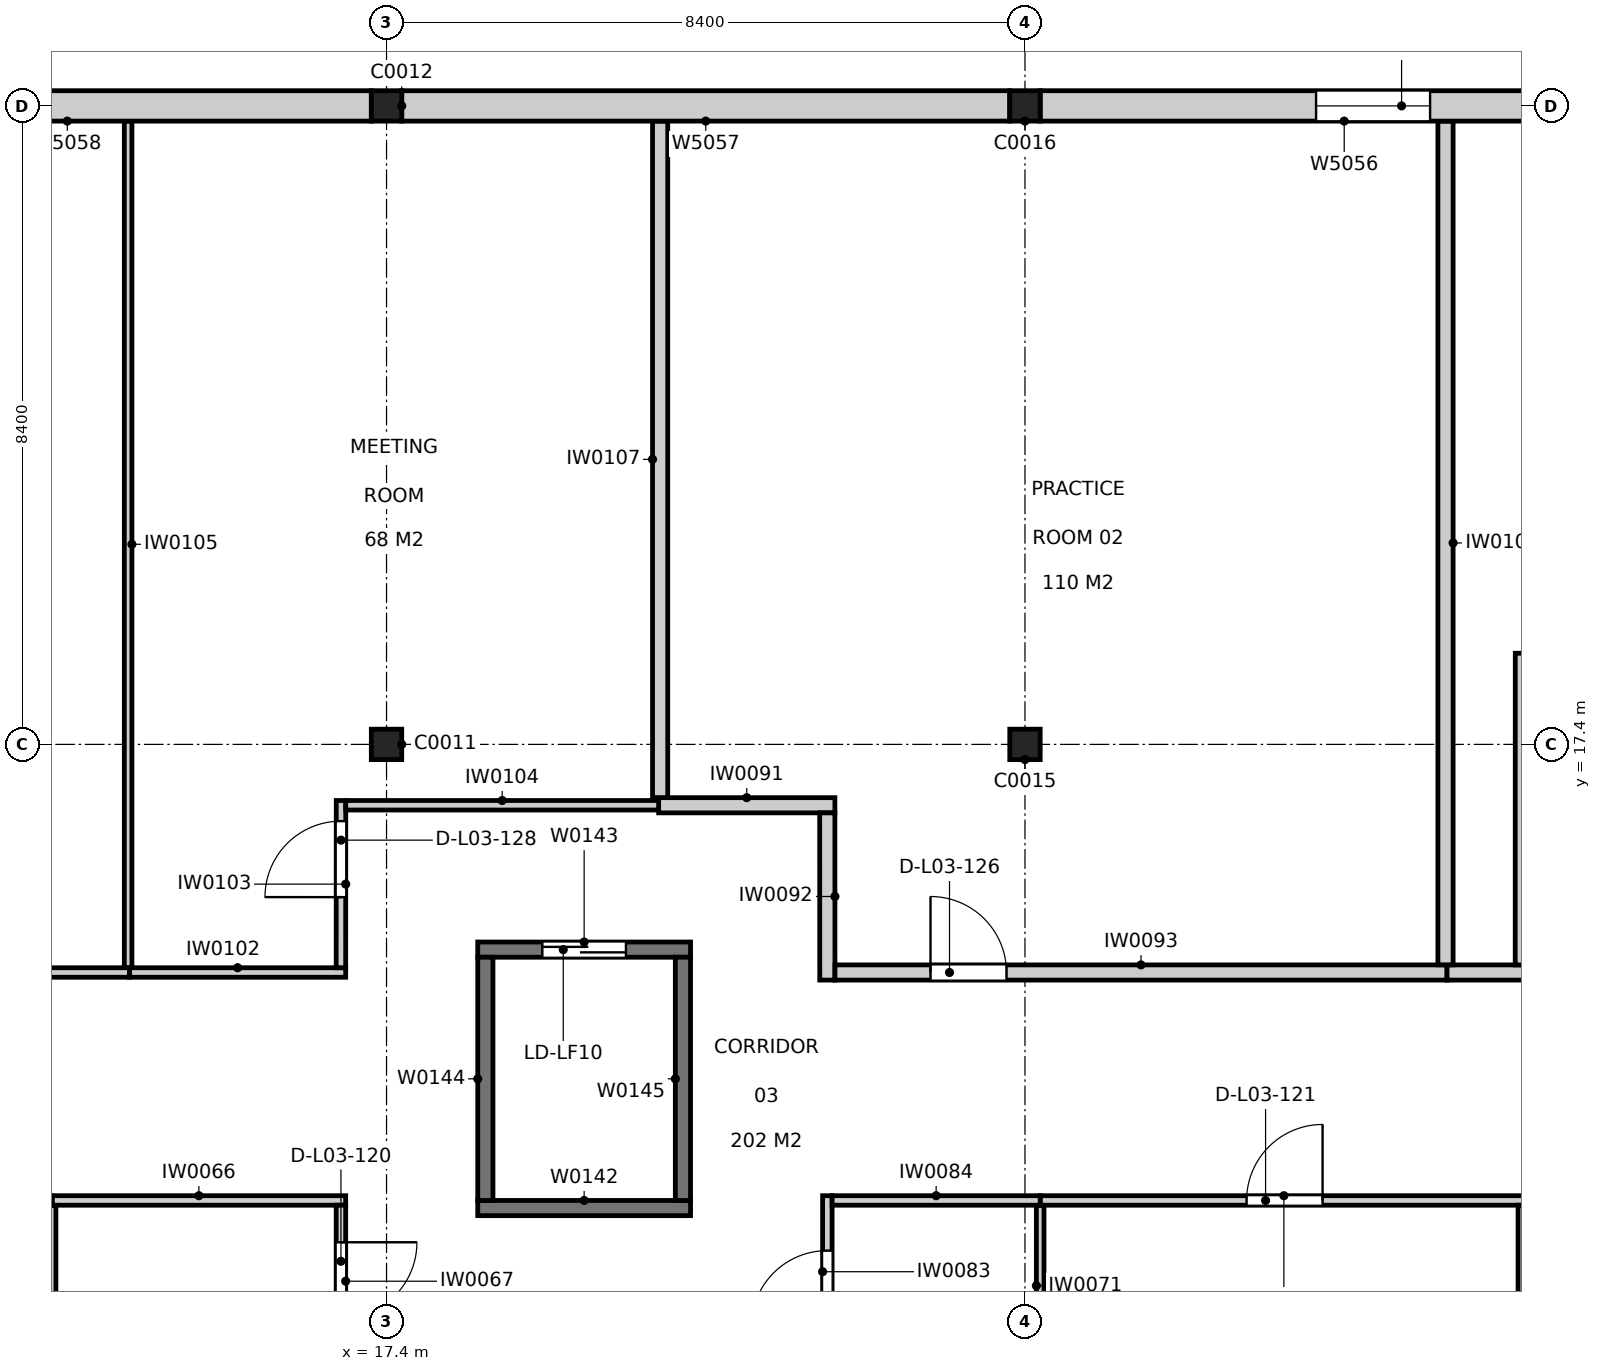
"""IFC4 building model, lengths in metres.
Left out: names, types, materials, properties, quantities, classifications, styles, units other than length and angle.
Written with IfcOpenShell. Run it as: python <this file> out.ifc"""

import sys

from ifc_helpers import new_model, si_unit, direction, frame, frame_2d, origin, origin_2d, place, context, subcontext, project, spatial, rectangle, extrude, element, fill, save


model = new_model("IFC4")
c1 = context("Model", 3, precision=1e-05, world=origin(), true_north=direction((0.0, 1.0)))
c2 = subcontext(c1, "Body", "Model", "MODEL_VIEW")
j1 = project(units=[si_unit("LENGTHUNIT", "METRE"), si_unit("PLANEANGLEUNIT", "RADIAN")], contexts=[c1])
p1 = place(None, origin())
s1 = spatial("IfcSite", under=j1, at=p1, CompositionType="ELEMENT")
p2 = place(p1, origin())
s2 = spatial("IfcBuilding", under=s1, at=p2, CompositionType="ELEMENT")
p3 = place(p2, frame((0.0, 0.0, 14.4)))
s3 = spatial("IfcBuildingStorey", under=s2, at=p3, CompositionType="ELEMENT", Elevation=14.4)
for number, where, z_axis, x_axis in (
    (1, (17.4, 17.4, 0.0), (0.0, 0.0, 1.0), (1.0, 0.0, 0.0)),
    (2, (17.4, 25.8, 0.0), (0.0, 0.0, 1.0), (1.0, 0.0, 0.0)),
    (3, (25.8, 17.4, 0.0), (0.0, 0.0, 1.0), (1.0, 0.0, 0.0)),
    (4, (25.8, 25.8, 0.0), (0.0, 0.0, 1.0), (1.0, 0.0, 0.0)),
):
    element("IfcColumn", number, at=place(p3, frame(where, z_axis=z_axis, x_axis=x_axis)), inside=s3, PredefinedType="COLUMN", context=c2, shape_type="SweptSolid", body=[
        extrude(rectangle(XDim=0.4, YDim=0.4, at=origin_2d()), origin(), (0.0, 0.0, 1.0), 4.8),
    ])
p4 = place(p3, frame((18.6, 11.3, 0.0), z_axis=(0.0, 0.0, 1.0), x_axis=(1.0, 0.0, 0.0)))
e5 = element("IfcWall", 5, at=p4, inside=s3, PredefinedType="SOLIDWALL", context=c2, shape_type="SweptSolid", body=[
    extrude(rectangle(XDim=2.8, YDim=0.2, at=frame_2d((1.4, 0.0))), origin(), (0.0, 0.0, 1.0), 4.8),
])
p5 = place(p3, frame((18.6, 14.7, 0.0), z_axis=(0.0, 0.0, 1.0), x_axis=(1.0, 0.0, 0.0)))
e6 = element("IfcWall", 6, at=p5, inside=s3, PredefinedType="SOLIDWALL", context=c2, shape_type="SweptSolid", body=[
    extrude(rectangle(XDim=2.8, YDim=0.2, at=frame_2d((1.4, 0.0))), origin(), (0.0, 0.0, 1.0), 4.8),
])
p6 = place(p5, frame((0.85, 0.0, 0.0)))
e7 = element("IfcOpeningElement", 7, at=p6, cuts=e6, PredefinedType="OPENING", context=c2, shape_type="SweptSolid", body=[
    extrude(rectangle(XDim=1.1, YDim=2.1, at=frame_2d((0.55, 1.05))), frame((0.0, 0.11, 0.0), z_axis=(0.0, -1.0, 0.0), x_axis=(1.0, 0.0, 0.0)), (0.0, 0.0, 1.0), 0.22),
])
for number, where, z_axis, x_axis in (
    (8, (18.7, 11.4, 0.0), (0.0, 0.0, 1.0), (0.0, 1.0, 0.0)),
    (9, (21.3, 11.4, 0.0), (0.0, 0.0, 1.0), (0.0, 1.0, 0.0)),
):
    element("IfcWall", number, at=place(p3, frame(where, z_axis=z_axis, x_axis=x_axis)), inside=s3, PredefinedType="SOLIDWALL", context=c2, shape_type="SweptSolid", body=[
        extrude(rectangle(XDim=3.2, YDim=0.2, at=frame_2d((1.6, 0.0))), origin(), (0.0, 0.0, 1.0), 4.8),
    ])
p7 = place(p3, frame((13.0, 0.8, 0.0), z_axis=(0.0, 0.0, 1.0), x_axis=(0.0, 1.0, 0.0)))
e10 = element("IfcWall", 10, at=p7, inside=s3, PredefinedType="PARTITIONING", context=c2, shape_type="SweptSolid", body=[
    extrude(rectangle(XDim=10.537, YDim=0.1, at=frame_2d((5.269, 0.0))), origin(), (0.0, 0.0, 1.0), 3.86),
])
p8 = place(p3, frame((13.0, 11.4, 0.0), z_axis=(0.0, 0.0, 1.0), x_axis=(1.0, 0.0, 0.0)))
e11 = element("IfcWall", 11, at=p8, inside=s3, PredefinedType="PARTITIONING", context=c2, shape_type="SweptSolid", body=[
    extrude(rectangle(XDim=3.863, YDim=0.125, at=frame_2d((1.931, 0.0))), origin(), (0.0, 0.0, 1.0), 4.64),
])
p9 = place(p3, frame((16.8, 11.337, 0.0), z_axis=(0.0, 0.0, 1.0), x_axis=(0.0, -1.0, 0.0)))
e12 = element("IfcWall", 12, at=p9, inside=s3, PredefinedType="PARTITIONING", context=c2, shape_type="SweptSolid", body=[
    extrude(rectangle(XDim=2.0, YDim=0.125, at=frame_2d((1.0, 0.0))), origin(), (0.0, 0.0, 1.0), 4.64),
])
p10 = place(p9, frame((0.488, 0.0, 0.0)))
e13 = element("IfcOpeningElement", 13, at=p10, cuts=e12, PredefinedType="OPENING", context=c2, shape_type="SweptSolid", body=[
    extrude(rectangle(XDim=1.0, YDim=2.1, at=frame_2d((0.5, 1.05))), frame((0.0, 0.073, 0.0), z_axis=(0.0, -1.0, 0.0), x_axis=(1.0, 0.0, 0.0)), (0.0, 0.0, 1.0), 0.145),
])
p11 = place(p3, frame((26.0, 9.22, 0.0), z_axis=(0.0, 0.0, 1.0), x_axis=(0.0, 1.0, 0.0)))
e14 = element("IfcWall", 14, at=p11, inside=s3, PredefinedType="PARTITIONING", context=c2, shape_type="SweptSolid", body=[
    extrude(rectangle(XDim=2.117, YDim=0.1, at=frame_2d((1.059, 0.0))), origin(), (0.0, 0.0, 1.0), 3.86),
])
p12 = place(p3, frame((26.0, 11.4, 0.0), z_axis=(0.0, 0.0, 1.0), x_axis=(1.0, 0.0, 0.0)))
e15 = element("IfcWall", 15, at=p12, inside=s3, PredefinedType="PARTITIONING", context=c2, shape_type="SweptSolid", body=[
    extrude(rectangle(XDim=6.413, YDim=0.125, at=frame_2d((3.206, 0.0))), origin(), (0.0, 0.0, 1.0), 4.64),
])
p13 = place(p12, frame((2.716, 0.0, 0.0)))
e16 = element("IfcOpeningElement", 16, at=p13, cuts=e15, PredefinedType="OPENING", context=c2, shape_type="SweptSolid", body=[
    extrude(rectangle(XDim=1.0, YDim=2.1, at=frame_2d((0.5, 1.05))), frame((0.0, 0.073, 0.0), z_axis=(0.0, -1.0, 0.0), x_axis=(1.0, 0.0, 0.0)), (0.0, 0.0, 1.0), 0.145),
])
p14 = place(p3, frame((32.35, 11.337, 0.0), z_axis=(0.0, 0.0, 1.0), x_axis=(0.0, -1.0, 0.0)))
e17 = element("IfcWall", 17, at=p14, inside=s3, PredefinedType="PARTITIONING", context=c2, shape_type="SweptSolid", body=[
    extrude(rectangle(XDim=3.9, YDim=0.125, at=frame_2d((1.95, 0.0))), origin(), (0.0, 0.0, 1.0), 3.86),
])
p15 = place(p3, frame((23.2, 9.462, 0.0), z_axis=(0.0, 0.0, 1.0), x_axis=(0.0, 1.0, 0.0)))
e18 = element("IfcWall", 18, at=p15, inside=s3, PredefinedType="PARTITIONING", context=c2, shape_type="SweptSolid", body=[
    extrude(rectangle(XDim=2.0, YDim=0.125, at=frame_2d((1.0, 0.0))), origin(), (0.0, 0.0, 1.0), 4.64),
])
p16 = place(p15, frame((0.278, 0.0, 0.0)))
e19 = element("IfcOpeningElement", 19, at=p16, cuts=e18, PredefinedType="OPENING", context=c2, shape_type="SweptSolid", body=[
    extrude(rectangle(XDim=1.0, YDim=2.1, at=frame_2d((0.5, 1.05))), frame((0.0, 0.073, 0.0), z_axis=(0.0, -1.0, 0.0), x_axis=(1.0, 0.0, 0.0)), (0.0, 0.0, 1.0), 0.145),
])
p17 = place(p3, frame((23.262, 11.4, 0.0), z_axis=(0.0, 0.0, 1.0), x_axis=(1.0, 0.0, 0.0)))
e20 = element("IfcWall", 20, at=p17, inside=s3, PredefinedType="PARTITIONING", context=c2, shape_type="SweptSolid", body=[
    extrude(rectangle(XDim=2.738, YDim=0.125, at=frame_2d((1.369, 0.0))), origin(), (0.0, 0.0, 1.0), 3.86),
])
p18 = place(p3, frame((9.712, 14.399, 0.0), z_axis=(0.0, 0.0, 1.0), x_axis=(1.0, 0.0, 0.0)))
e21 = element("IfcWall", 21, at=p18, inside=s3, PredefinedType="PARTITIONING", context=c2, shape_type="SweptSolid", body=[
    extrude(rectangle(XDim=4.308, YDim=0.125, at=frame_2d((2.154, 0.0))), origin(), (0.0, 0.0, 1.0), 4.06),
])
p19 = place(p3, frame((20.98, 16.599, 0.0), z_axis=(0.0, 0.0, 1.0), x_axis=(1.0, 0.0, 0.0)))
e22 = element("IfcWall", 22, at=p19, inside=s3, PredefinedType="PARTITIONING", context=c2, shape_type="SweptSolid", body=[
    extrude(rectangle(XDim=2.319, YDim=0.2, at=frame_2d((1.16, 0.0))), origin(), (0.0, 0.0, 1.0), 4.64),
])
p20 = place(p3, frame((23.199, 16.499, 0.0), z_axis=(0.0, 0.0, 1.0), x_axis=(0.000443901854, -0.999999901476, 0.0)))
e23 = element("IfcWall", 23, at=p20, inside=s3, PredefinedType="PARTITIONING", context=c2, shape_type="SweptSolid", body=[
    extrude(rectangle(XDim=2.2, YDim=0.2, at=frame_2d((1.1, 0.0))), origin(), (0.0, 0.0, 1.0), 4.06),
])
p21 = place(p3, frame((23.3, 14.399, 0.0), z_axis=(0.0, 0.0, 1.0), x_axis=(1.0, 0.0, 0.0)))
e24 = element("IfcWall", 24, at=p21, inside=s3, PredefinedType="PARTITIONING", context=c2, shape_type="SweptSolid", body=[
    extrude(rectangle(XDim=8.053, YDim=0.2, at=frame_2d((4.026, 0.0))), origin(), (0.0, 0.0, 1.0), 3.86),
])
p22 = place(p21, frame((1.257, 0.0, 0.0)))
e25 = element("IfcOpeningElement", 25, at=p22, cuts=e24, PredefinedType="OPENING", context=c2, shape_type="SweptSolid", body=[
    extrude(rectangle(XDim=1.0, YDim=2.1, at=frame_2d((0.5, 1.05))), frame((0.0, 0.11, 0.0), z_axis=(0.0, -1.0, 0.0), x_axis=(1.0, 0.0, 0.0)), (0.0, 0.0, 1.0), 0.22),
])
p23 = place(p3, frame((31.353, 14.399, 0.0), z_axis=(0.0, 0.0, 1.0), x_axis=(1.0, 0.0, 0.0)))
e26 = element("IfcWall", 26, at=p23, inside=s3, PredefinedType="PARTITIONING", context=c2, shape_type="SweptSolid", body=[
    extrude(rectangle(XDim=1.097, YDim=0.2, at=frame_2d((0.548, 0.0))), origin(), (0.0, 0.0, 1.0), 4.06),
])
p24 = place(p3, frame((32.35, 14.499, 0.0), z_axis=(0.0, 0.0, 1.0), x_axis=(0.000238180296, 0.999999971635, 0.0)))
e27 = element("IfcWall", 27, at=p24, inside=s3, PredefinedType="PARTITIONING", context=c2, shape_type="SweptSolid", body=[
    extrude(rectangle(XDim=4.1, YDim=0.2, at=frame_2d((2.05, 0.0))), origin(), (0.0, 0.0, 1.0), 3.86),
])
p25 = place(p3, frame((14.02, 14.399, 0.0), z_axis=(0.0, 0.0, 1.0), x_axis=(1.0, 0.0, 0.0)))
e28 = element("IfcWall", 28, at=p25, inside=s3, PredefinedType="PARTITIONING", context=c2, shape_type="SweptSolid", body=[
    extrude(rectangle(XDim=2.843, YDim=0.125, at=frame_2d((1.421, 0.0))), origin(), (0.0, 0.0, 1.0), 4.06),
])
p26 = place(p3, frame((16.8, 14.461, 0.0), z_axis=(0.0, 0.0, 1.0), x_axis=(0.000443852597, 0.999999901497, 0.0)))
e29 = element("IfcWall", 29, at=p26, inside=s3, PredefinedType="PARTITIONING", context=c2, shape_type="SweptSolid", body=[
    extrude(rectangle(XDim=2.2, YDim=0.125, at=frame_2d((1.1, 0.0))), origin(), (0.0, 0.0, 1.0), 4.06),
])
p27 = place(p26, frame((0.929, 0.0, 0.0)))
e30 = element("IfcOpeningElement", 30, at=p27, cuts=e29, PredefinedType="OPENING", context=c2, shape_type="SweptSolid", body=[
    extrude(rectangle(XDim=1.0, YDim=2.1, at=frame_2d((0.5, 1.05))), frame((0.0, 0.073, 0.0), z_axis=(0.0, -1.0, 0.0), x_axis=(1.0, 0.0, 0.0)), (0.0, 0.0, 1.0), 0.145),
])
p28 = place(p3, frame((16.864, 16.599, 0.0), z_axis=(0.0, 0.0, 1.0), x_axis=(1.0, 0.0, 0.0)))
e31 = element("IfcWall", 31, at=p28, inside=s3, PredefinedType="PARTITIONING", context=c2, shape_type="SweptSolid", body=[
    extrude(rectangle(XDim=4.116, YDim=0.125, at=frame_2d((2.058, 0.0))), origin(), (0.0, 0.0, 1.0), 3.86),
])
p29 = place(p3, frame((14.0, 25.6, 0.0), z_axis=(0.0, 0.0, 1.0), x_axis=(0.0, -1.0, 0.0)))
e32 = element("IfcWall", 32, at=p29, inside=s3, PredefinedType="PARTITIONING", context=c2, shape_type="SweptSolid", body=[
    extrude(rectangle(XDim=11.135, YDim=0.1, at=frame_2d((5.567, 0.0))), origin(), (0.0, 0.0, 1.0), 3.86),
])
p30 = place(p3, frame((31.333, 25.6, 0.0), z_axis=(0.0, 0.0, 1.0), x_axis=(0.0, -1.0, 0.0)))
e33 = element("IfcWall", 33, at=p30, inside=s3, PredefinedType="PARTITIONING", context=c2, shape_type="SweptSolid", body=[
    extrude(rectangle(XDim=11.1, YDim=0.2, at=frame_2d((5.55, 0.0))), origin(), (0.0, 0.0, 1.0), 3.86),
])
p31 = place(p3, frame((21.0, 16.7, 0.0), z_axis=(0.0, 0.0, 1.0), x_axis=(0.0, 1.0, 0.0)))
e34 = element("IfcWall", 34, at=p31, inside=s3, PredefinedType="PARTITIONING", context=c2, shape_type="SweptSolid", body=[
    extrude(rectangle(XDim=8.9, YDim=0.2, at=frame_2d((4.45, 0.0))), origin(), (0.0, 0.0, 1.0), 3.86),
])
p32 = place(p3, frame((34.0, 25.8, 0.0), z_axis=(0.0, 0.0, 1.0), x_axis=(-1.0, 0.0, 0.0)))
e35 = element("IfcWall", 35, at=p32, inside=s3, PredefinedType="SOLIDWALL", context=c2, shape_type="SweptSolid", body=[
    extrude(rectangle(XDim=8.0, YDim=0.4, at=frame_2d((4.0, 0.0))), origin(), (0.0, 0.0, 1.0), 3.86),
])
p33 = place(p32, frame((2.87, 0.0, 0.9)))
e36 = element("IfcOpeningElement", 36, at=p33, cuts=e35, PredefinedType="OPENING", context=c2, shape_type="SweptSolid", body=[
    extrude(rectangle(XDim=1.5, YDim=1.5, at=frame_2d((0.75, 0.75))), frame((0.0, 0.21, 0.0), z_axis=(0.0, -1.0, 0.0), x_axis=(1.0, 0.0, 0.0)), (0.0, 0.0, 1.0), 0.42),
])
p34 = place(p3, frame((25.6, 25.8, 0.0), z_axis=(0.0, 0.0, 1.0), x_axis=(-1.0, 0.0, 0.0)))
e37 = element("IfcWall", 37, at=p34, inside=s3, PredefinedType="SOLIDWALL", context=c2, shape_type="SweptSolid", body=[
    extrude(rectangle(XDim=8.0, YDim=0.4, at=frame_2d((4.0, 0.0))), origin(), (0.0, 0.0, 1.0), 3.86),
])
p35 = place(p3, frame((17.2, 25.8, 0.0), z_axis=(0.0, 0.0, 1.0), x_axis=(-1.0, 0.0, 0.0)))
e38 = element("IfcWall", 38, at=p35, inside=s3, PredefinedType="SOLIDWALL", context=c2, shape_type="SweptSolid", body=[
    extrude(rectangle(XDim=8.0, YDim=0.4, at=frame_2d((4.0, 0.0))), origin(), (0.0, 0.0, 1.0), 3.86),
])
p36 = place(p10, origin())
e39 = element("IfcDoor", 39, at=p36, inside=s3, OperationType="SINGLE_SWING_LEFT", PredefinedType="DOOR", context=c2, shape_type="SweptSolid", body=[
    extrude(rectangle(XDim=1.0, YDim=2.1, at=frame_2d((0.5, 1.05))), frame((0.0, 0.025, 0.0), z_axis=(0.0, -1.0, 0.0), x_axis=(1.0, 0.0, 0.0)), (0.0, 0.0, 1.0), 0.05),
])
fill(e13, e39)
p37 = place(p13, origin())
e40 = element("IfcDoor", 40, at=p37, inside=s3, OperationType="SINGLE_SWING_RIGHT", PredefinedType="DOOR", context=c2, shape_type="SweptSolid", body=[
    extrude(rectangle(XDim=1.0, YDim=2.1, at=frame_2d((0.5, 1.05))), frame((0.0, 0.025, 0.0), z_axis=(0.0, -1.0, 0.0), x_axis=(1.0, 0.0, 0.0)), (0.0, 0.0, 1.0), 0.05),
])
fill(e16, e40)
p38 = place(p16, origin())
e41 = element("IfcDoor", 41, at=p38, inside=s3, OperationType="SINGLE_SWING_LEFT", PredefinedType="DOOR", context=c2, shape_type="SweptSolid", body=[
    extrude(rectangle(XDim=1.0, YDim=2.1, at=frame_2d((0.5, 1.05))), frame((0.0, 0.025, 0.0), z_axis=(0.0, -1.0, 0.0), x_axis=(1.0, 0.0, 0.0)), (0.0, 0.0, 1.0), 0.05),
])
fill(e19, e41)
p39 = place(p22, origin())
e42 = element("IfcDoor", 42, at=p39, inside=s3, OperationType="SINGLE_SWING_LEFT", PredefinedType="DOOR", context=c2, shape_type="SweptSolid", body=[
    extrude(rectangle(XDim=1.0, YDim=2.1, at=frame_2d((0.5, 1.05))), frame((0.0, 0.025, 0.0), z_axis=(0.0, -1.0, 0.0), x_axis=(1.0, 0.0, 0.0)), (0.0, 0.0, 1.0), 0.05),
])
fill(e25, e42)
p40 = place(p27, origin())
e43 = element("IfcDoor", 43, at=p40, inside=s3, OperationType="SINGLE_SWING_LEFT", PredefinedType="DOOR", context=c2, shape_type="SweptSolid", body=[
    extrude(rectangle(XDim=1.0, YDim=2.1, at=frame_2d((0.5, 1.05))), frame((0.0, 0.025, 0.0), z_axis=(0.0, -1.0, 0.0), x_axis=(1.0, 0.0, 0.0)), (0.0, 0.0, 1.0), 0.05),
])
fill(e30, e43)
p41 = place(p33, origin())
e44 = element("IfcWindow", 44, at=p41, inside=s3, PartitioningType="DOUBLE_PANEL_VERTICAL", PredefinedType="WINDOW", context=c2, shape_type="SweptSolid", body=[
    extrude(rectangle(XDim=1.5, YDim=1.5, at=frame_2d((0.75, 0.75))), frame((0.0, 0.15, 0.0), z_axis=(0.0, -1.0, 0.0), x_axis=(1.0, 0.0, 0.0)), (0.0, 0.0, 1.0), 0.06),
])
fill(e36, e44)
p42 = place(p6, origin())
e45 = element("IfcDoor", 45, at=p42, inside=s3, OperationType="SLIDING_TO_LEFT", PredefinedType="DOOR", context=c2, shape_type="SweptSolid", body=[
    extrude(rectangle(XDim=1.1, YDim=2.1, at=frame_2d((0.55, 1.05))), frame((0.0, 0.025, 0.0), z_axis=(0.0, -1.0, 0.0), x_axis=(1.0, 0.0, 0.0)), (0.0, 0.0, 1.0), 0.05),
])
fill(e7, e45)
save(model, sys.argv[1])
